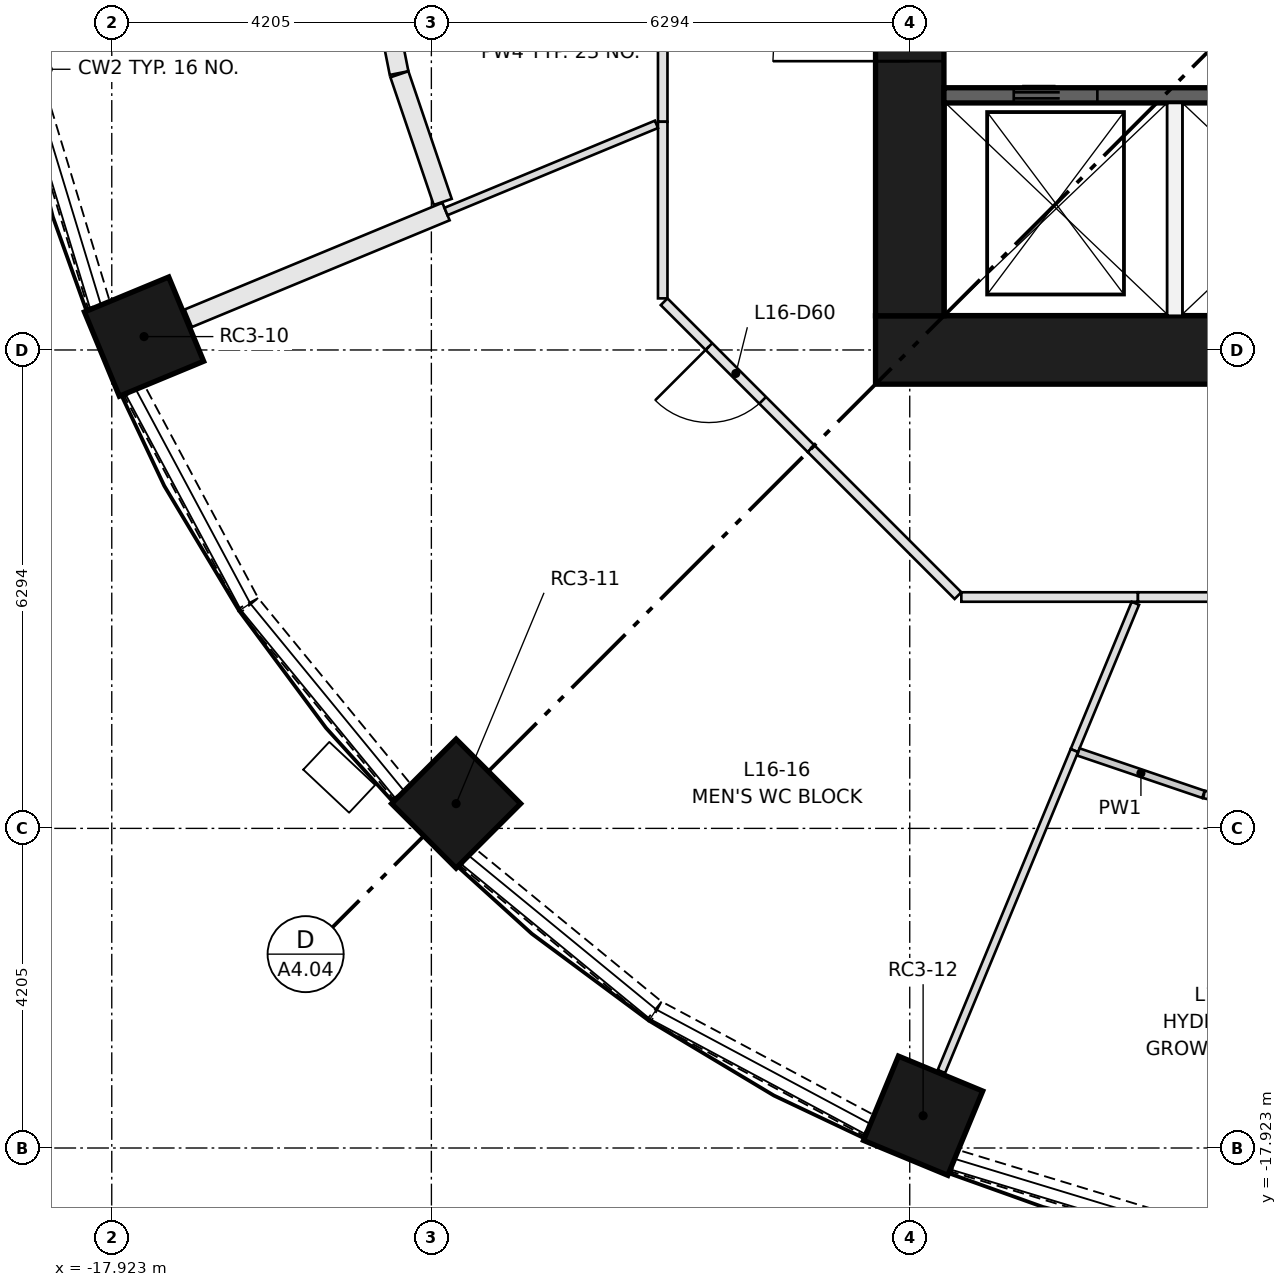
"""IFC4 building model, lengths in metres.
Left out: names, types, materials, properties, quantities, classifications, styles, units other than length and angle.
Written with IfcOpenShell. Run it as: python <this file> out.ifc"""

import sys

from ifc_helpers import new_model, si_unit, direction, frame, frame_2d, origin, origin_2d, place, context, subcontext, project, spatial, rectangle, extrude, element, fill, save


model = new_model("IFC4")
c1 = context("Model", 3, precision=1e-05, world=origin(), true_north=direction((0.0, 1.0)))
c2 = subcontext(c1, "Body", "Model", "MODEL_VIEW")
j1 = project(units=[si_unit("LENGTHUNIT", "METRE"), si_unit("PLANEANGLEUNIT", "RADIAN")], contexts=[c1])
p1 = place(None, origin())
s1 = spatial("IfcSite", under=j1, at=p1, CompositionType="ELEMENT")
p2 = place(p1, origin())
s2 = spatial("IfcBuilding", under=s1, at=p2, CompositionType="ELEMENT")
p3 = place(p2, frame((0.0, 0.0, 62.7)))
s3 = spatial("IfcBuildingStorey", under=s2, at=p3, CompositionType="ELEMENT", Elevation=62.7)
for number, where, z_axis, x_axis in (
    (1, (-17.498, -7.248, 0.0), (0.0, 0.0, 1.0), (-0.924, -0.383, 0.0)),
    (2, (-13.393, -13.393, 0.0), (0.0, 0.0, 1.0), (-0.707, -0.707, 0.0)),
    (3, (-7.248, -17.498, 0.0), (0.0, 0.0, 1.0), (-0.383, -0.924, 0.0)),
):
    element("IfcColumn", number, at=place(p3, frame(where, z_axis=z_axis, x_axis=x_axis)), inside=s3, PredefinedType="COLUMN", context=c2, shape_type="SweptSolid", body=[
        extrude(rectangle(XDim=1.2, YDim=1.2, at=origin_2d()), origin(), (0.0, 0.0, 1.0), 3.65),
    ])
p4 = place(p3, frame((-7.874, -7.424, 0.0), z_axis=(0.0, 0.0, 1.0), x_axis=(1.0, 0.0, 0.0)))
e4 = element("IfcWall", 4, at=p4, inside=s3, PredefinedType="SHEAR", context=c2, shape_type="SweptSolid", body=[
    extrude(rectangle(XDim=15.748, YDim=0.9, at=frame_2d((7.874, 0.0))), origin(), (0.0, 0.0, 1.0), 3.65),
])
p5 = place(p3, frame((-7.424, -6.974, 0.0), z_axis=(0.0, 0.0, 1.0), x_axis=(0.0, 1.0, 0.0)))
e5 = element("IfcWall", 5, at=p5, inside=s3, PredefinedType="SHEAR", context=c2, shape_type="SweptSolid", body=[
    extrude(rectangle(XDim=13.948, YDim=0.9, at=frame_2d((6.974, 0.0))), origin(), (0.0, 0.0, 1.0), 3.65),
])
p6 = place(p5, frame((6.474, 0.0, 0.0)))
e6 = element("IfcOpeningElement", 6, at=p6, cuts=e5, PredefinedType="OPENING", context=c2, shape_type="SweptSolid", body=[
    extrude(rectangle(XDim=1.0, YDim=2.1, at=frame_2d((0.5, 1.05))), frame((0.0, 0.46, 0.0), z_axis=(0.0, -1.0, 0.0), x_axis=(1.0, 0.0, 0.0)), (0.0, 0.0, 1.0), 0.92),
])
p7 = place(p5, frame((3.35, 0.0, 0.0)))
e7 = element("IfcOpeningElement", 7, at=p7, cuts=e5, PredefinedType="OPENING", context=c2, shape_type="SweptSolid", body=[
    extrude(rectangle(XDim=1.8, YDim=2.1, at=frame_2d((0.9, 1.05))), frame((0.0, 0.46, 0.0), z_axis=(0.0, -1.0, 0.0), x_axis=(1.0, 0.0, 0.0)), (0.0, 0.0, 1.0), 0.92),
])
p8 = place(p5, frame((8.799, 0.0, 0.0)))
e8 = element("IfcOpeningElement", 8, at=p8, cuts=e5, PredefinedType="OPENING", context=c2, shape_type="SweptSolid", body=[
    extrude(rectangle(XDim=1.8, YDim=2.1, at=frame_2d((0.9, 1.05))), frame((0.0, 0.46, 0.0), z_axis=(0.0, -1.0, 0.0), x_axis=(1.0, 0.0, 0.0)), (0.0, 0.0, 1.0), 0.92),
])
p9 = place(p5, frame((11.974, 0.0, 0.0)))
e9 = element("IfcOpeningElement", 9, at=p9, cuts=e5, PredefinedType="OPENING", context=c2, shape_type="SweptSolid", body=[
    extrude(rectangle(XDim=1.0, YDim=2.1, at=frame_2d((0.5, 1.05))), frame((0.0, 0.46, 0.0), z_axis=(0.0, -1.0, 0.0), x_axis=(1.0, 0.0, 0.0)), (0.0, 0.0, 1.0), 0.92),
])
p10 = place(p3, frame((-6.974, -4.074, 0.0), z_axis=(0.0, 0.0, 1.0), x_axis=(1.0, 0.0, 0.0)))
e10 = element("IfcWall", 10, at=p10, inside=s3, PredefinedType="SHEAR", context=c2, shape_type="SweptSolid", body=[
    extrude(rectangle(XDim=13.948, YDim=0.2, at=frame_2d((6.974, 0.0))), origin(), (0.0, 0.0, 1.0), 3.3),
])
p11 = place(p10, frame((0.918, 0.0, 0.0)))
e11 = element("IfcOpeningElement", 11, at=p11, cuts=e10, PredefinedType="OPENING", context=c2, shape_type="SweptSolid", body=[
    extrude(rectangle(XDim=1.1, YDim=2.1, at=frame_2d((0.55, 1.05))), frame((0.0, 0.11, 0.0), z_axis=(0.0, -1.0, 0.0), x_axis=(1.0, 0.0, 0.0)), (0.0, 0.0, 1.0), 0.22),
])
p12 = place(p10, frame((4.055, 0.0, 0.0)))
e12 = element("IfcOpeningElement", 12, at=p12, cuts=e10, PredefinedType="OPENING", context=c2, shape_type="SweptSolid", body=[
    extrude(rectangle(XDim=1.1, YDim=2.1, at=frame_2d((0.55, 1.05))), frame((0.0, 0.11, 0.0), z_axis=(0.0, -1.0, 0.0), x_axis=(1.0, 0.0, 0.0)), (0.0, 0.0, 1.0), 0.22),
])
p13 = place(p10, frame((6.658, 0.0, 0.0)))
e13 = element("IfcOpeningElement", 13, at=p13, cuts=e10, PredefinedType="OPENING", context=c2, shape_type="SweptSolid", body=[
    extrude(rectangle(XDim=1.0, YDim=2.1, at=frame_2d((0.5, 1.05))), frame((0.0, 0.11, 0.0), z_axis=(0.0, -1.0, 0.0), x_axis=(1.0, 0.0, 0.0)), (0.0, 0.0, 1.0), 0.22),
])
p14 = place(p10, frame((8.627, 0.0, 0.0)))
e14 = element("IfcOpeningElement", 14, at=p14, cuts=e10, PredefinedType="OPENING", context=c2, shape_type="SweptSolid", body=[
    extrude(rectangle(XDim=1.0, YDim=2.1, at=frame_2d((0.5, 1.05))), frame((0.0, 0.11, 0.0), z_axis=(0.0, -1.0, 0.0), x_axis=(1.0, 0.0, 0.0)), (0.0, 0.0, 1.0), 0.22),
])
p15 = place(p10, frame((10.595, 0.0, 0.0)))
e15 = element("IfcOpeningElement", 15, at=p15, cuts=e10, PredefinedType="OPENING", context=c2, shape_type="SweptSolid", body=[
    extrude(rectangle(XDim=1.0, YDim=2.1, at=frame_2d((0.5, 1.05))), frame((0.0, 0.11, 0.0), z_axis=(0.0, -1.0, 0.0), x_axis=(1.0, 0.0, 0.0)), (0.0, 0.0, 1.0), 0.22),
])
p16 = place(p10, frame((12.564, 0.0, 0.0)))
e16 = element("IfcOpeningElement", 16, at=p16, cuts=e10, PredefinedType="OPENING", context=c2, shape_type="SweptSolid", body=[
    extrude(rectangle(XDim=1.0, YDim=2.1, at=frame_2d((0.5, 1.05))), frame((0.0, 0.11, 0.0), z_axis=(0.0, -1.0, 0.0), x_axis=(1.0, 0.0, 0.0)), (0.0, 0.0, 1.0), 0.22),
])
p17 = place(p3, frame((-3.937, -6.974, 0.0), z_axis=(0.0, 0.0, 1.0), x_axis=(0.0, 1.0, 0.0)))
e17 = element("IfcWall", 17, at=p17, inside=s3, PredefinedType="PARTITIONING", context=c2, shape_type="SweptSolid", body=[
    extrude(rectangle(XDim=2.8, YDim=0.2, at=frame_2d((1.4, 0.0))), origin(), (0.0, 0.0, 1.0), 3.3),
])
p18 = place(p3, frame((-19.013, -3.797, 0.0), z_axis=(0.0, 0.0, 1.0), x_axis=(0.290456409527, -0.956888224489, 0.0)))
e18 = element("IfcWall", 18, at=p18, inside=s3, PredefinedType="SOLIDWALL", context=c2, shape_type="SweptSolid", body=[
    extrude(rectangle(XDim=3.169, YDim=0.3, at=frame_2d((1.584, 0.0))), origin(), (0.0, 0.0, 1.0), 0.9),
])
p19 = place(p3, frame((-17.623, -7.963, 0.0), z_axis=(0.0, 0.0, 1.0), x_axis=(0.47123575379, -0.882007292685, 0.0)))
e19 = element("IfcWall", 19, at=p19, inside=s3, PredefinedType="SOLIDWALL", context=c2, shape_type="SweptSolid", body=[
    extrude(rectangle(XDim=3.17, YDim=0.3, at=frame_2d((1.585, 0.0))), origin(), (0.0, 0.0, 1.0), 0.9),
])
for number, where, z_axis, x_axis in (
    (20, (-16.113, -10.784, 0.0), (0.0, 0.0, 1.0), (0.634, -0.773, 0.0)),
    (21, (-13.234, -14.103, 0.0), (0.0, 0.0, 1.0), (0.773, -0.634, 0.0)),
):
    element("IfcWall", number, at=place(p3, frame(where, z_axis=z_axis, x_axis=x_axis)), inside=s3, PredefinedType="SOLIDWALL", context=c2, shape_type="SweptSolid", body=[
        extrude(rectangle(XDim=3.169, YDim=0.3, at=frame_2d((1.585, 0.0))), origin(), (0.0, 0.0, 1.0), 0.9),
    ])
p20 = place(p3, frame((-10.759, -16.129, 0.0), z_axis=(0.0, 0.0, 1.0), x_axis=(0.882007292685, -0.47123575379, 0.0)))
e22 = element("IfcWall", 22, at=p20, inside=s3, PredefinedType="SOLIDWALL", context=c2, shape_type="SweptSolid", body=[
    extrude(rectangle(XDim=3.17, YDim=0.3, at=frame_2d((1.585, 0.0))), origin(), (0.0, 0.0, 1.0), 0.9),
])
p21 = place(p3, frame((-6.83, -18.092, 0.0), z_axis=(0.0, 0.0, 1.0), x_axis=(0.956888224489, -0.290456409527, 0.0)))
e23 = element("IfcWall", 23, at=p21, inside=s3, PredefinedType="SOLIDWALL", context=c2, shape_type="SweptSolid", body=[
    extrude(rectangle(XDim=3.169, YDim=0.3, at=frame_2d((1.584, 0.0))), origin(), (0.0, 0.0, 1.0), 0.9),
])
p22 = place(p3, frame((-10.674, -4.421, 0.0), z_axis=(0.0, 0.0, 1.0), x_axis=(0.0, 1.0, 0.0)))
e24 = element("IfcWall", 24, at=p22, inside=s3, PredefinedType="PARTITIONING", context=c2, shape_type="SweptSolid", body=[
    extrude(rectangle(XDim=4.484, YDim=0.125, at=frame_2d((2.242, 0.0))), origin(), (0.0, 0.0, 1.0), 3.3),
])
p23 = place(p22, frame((1.7, 0.0, 0.0)))
e25 = element("IfcOpeningElement", 25, at=p23, cuts=e24, PredefinedType="OPENING", context=c2, shape_type="SweptSolid", body=[
    extrude(rectangle(XDim=1.0, YDim=2.1, at=frame_2d((0.5, 1.05))), frame((0.0, 0.073, 0.0), z_axis=(0.0, -1.0, 0.0), x_axis=(1.0, 0.0, 0.0)), (0.0, 0.0, 1.0), 0.145),
])
p24 = place(p3, frame((-10.674, -6.745, 0.0), z_axis=(0.0, 0.0, 1.0), x_axis=(0.0, 1.0, 0.0)))
e26 = element("IfcWall", 26, at=p24, inside=s3, PredefinedType="PARTITIONING", context=c2, shape_type="SweptSolid", body=[
    extrude(rectangle(XDim=2.324, YDim=0.125, at=frame_2d((1.162, 0.0))), origin(), (0.0, 0.0, 1.0), 3.3),
])
p25 = place(p3, frame((-8.722, -8.722, 0.0), z_axis=(0.0, 0.0, 1.0), x_axis=(-0.707151428813, 0.707062130741, 0.0)))
e27 = element("IfcWall", 27, at=p25, inside=s3, PredefinedType="PARTITIONING", context=c2, shape_type="SweptSolid", body=[
    extrude(rectangle(XDim=2.734, YDim=0.125, at=frame_2d((1.367, 0.0))), origin(), (0.0, 0.0, 1.0), 3.3),
])
p26 = place(p25, frame((0.9, 0.0, 0.0)))
e28 = element("IfcOpeningElement", 28, at=p26, cuts=e27, PredefinedType="OPENING", context=c2, shape_type="SweptSolid", body=[
    extrude(rectangle(XDim=1.0, YDim=2.1, at=frame_2d((0.5, 1.05))), frame((0.0, 0.073, 0.0), z_axis=(0.0, -1.0, 0.0), x_axis=(1.0, 0.0, 0.0)), (0.0, 0.0, 1.0), 0.145),
])
p27 = place(p3, frame((-6.789, -10.656, 0.0), z_axis=(0.0, 0.0, 1.0), x_axis=(-0.707062130741, 0.707151428813, 0.0)))
e29 = element("IfcWall", 29, at=p27, inside=s3, PredefinedType="PARTITIONING", context=c2, shape_type="SweptSolid", body=[
    extrude(rectangle(XDim=2.734, YDim=0.125, at=frame_2d((1.367, 0.0))), origin(), (0.0, 0.0, 1.0), 3.3),
])
p28 = place(p3, frame((-4.421, -10.674, 0.0), z_axis=(0.0, 0.0, 1.0), x_axis=(-1.0, 0.0, 0.0)))
e30 = element("IfcWall", 30, at=p28, inside=s3, PredefinedType="PARTITIONING", context=c2, shape_type="SweptSolid", body=[
    extrude(rectangle(XDim=2.324, YDim=0.125, at=frame_2d((1.162, 0.0))), origin(), (0.0, 0.0, 1.0), 3.3),
])
p29 = place(p3, frame((0.0, -10.674, 0.0), z_axis=(0.0, 0.0, 1.0), x_axis=(-1.0, 0.0, 0.0)))
e31 = element("IfcWall", 31, at=p29, inside=s3, PredefinedType="PARTITIONING", context=c2, shape_type="SweptSolid", body=[
    extrude(rectangle(XDim=4.421, YDim=0.125, at=frame_2d((2.211, 0.0))), origin(), (0.0, 0.0, 1.0), 3.3),
])
p30 = place(p29, frame((1.7, 0.0, 0.0)))
e32 = element("IfcOpeningElement", 32, at=p30, cuts=e31, PredefinedType="OPENING", context=c2, shape_type="SweptSolid", body=[
    extrude(rectangle(XDim=1.0, YDim=2.1, at=frame_2d((0.5, 1.05))), frame((0.0, 0.073, 0.0), z_axis=(0.0, -1.0, 0.0), x_axis=(1.0, 0.0, 0.0)), (0.0, 0.0, 1.0), 0.145),
])
p31 = place(p3, frame((-14.513, -1.919, 0.0), z_axis=(0.0, 0.0, 1.0), x_axis=(0.195077379777, -0.980787854686, 0.0)))
e33 = element("IfcWall", 33, at=p31, inside=s3, PredefinedType="PARTITIONING", context=c2, shape_type="SweptSolid", body=[
    extrude(rectangle(XDim=1.898, YDim=0.25, at=frame_2d((0.949, 0.0))), origin(), (0.0, 0.0, 1.0), 3.3),
])
p32 = place(p3, frame((-14.139, -3.797, 0.0), z_axis=(0.0, 0.0, 1.0), x_axis=(0.321468303742, -0.946920339674, 0.0)))
e34 = element("IfcWall", 34, at=p32, inside=s3, PredefinedType="PARTITIONING", context=c2, shape_type="SweptSolid", body=[
    extrude(rectangle(XDim=1.773, YDim=0.25, at=frame_2d((0.887, 0.0))), origin(), (0.0, 0.0, 1.0), 3.3),
])
p33 = place(p3, frame((-13.526, -5.603, 0.0), z_axis=(0.0, 0.0, 1.0), x_axis=(-0.923870076355, -0.382706260748, 0.0)))
e35 = element("IfcWall", 35, at=p33, inside=s3, PredefinedType="PARTITIONING", context=c2, shape_type="SweptSolid", body=[
    extrude(rectangle(XDim=3.67, YDim=0.25, at=frame_2d((1.835, 0.0))), origin(), (0.0, 0.0, 1.0), 3.3),
])
p34 = place(p3, frame((-10.757, -4.456, 0.0), z_axis=(0.0, 0.0, 1.0), x_axis=(-0.923879826967, -0.382682721486, 0.0)))
e36 = element("IfcWall", 36, at=p34, inside=s3, PredefinedType="PARTITIONING", context=c2, shape_type="SweptSolid", body=[
    extrude(rectangle(XDim=2.997, YDim=0.105, at=frame_2d((1.499, 0.0))), origin(), (0.0, 0.0, 1.0), 3.3),
])
p35 = place(p3, frame((-4.456, -10.757, 0.0), z_axis=(0.0, 0.0, 1.0), x_axis=(-0.382663674763, -0.92388771613, 0.0)))
e37 = element("IfcWall", 37, at=p35, inside=s3, PredefinedType="PARTITIONING", context=c2, shape_type="SweptSolid", body=[
    extrude(rectangle(XDim=2.097, YDim=0.105, at=frame_2d((1.049, 0.0))), origin(), (0.0, 0.0, 1.0), 3.3),
])
p36 = place(p3, frame((-5.258, -12.694, 0.0), z_axis=(0.0, 0.0, 1.0), x_axis=(-0.382710364739, -0.923868376297, 0.0)))
e38 = element("IfcWall", 38, at=p36, inside=s3, PredefinedType="PARTITIONING", context=c2, shape_type="SweptSolid", body=[
    extrude(rectangle(XDim=4.57, YDim=0.105, at=frame_2d((2.285, 0.0))), origin(), (0.0, 0.0, 1.0), 3.3),
])
p37 = place(p3, frame((-3.559, -13.271, 0.0), z_axis=(0.0, 0.0, 1.0), x_axis=(-0.946941295521, 0.321406569374, 0.0)))
e39 = element("IfcWall", 39, at=p37, inside=s3, PredefinedType="PARTITIONING", context=c2, shape_type="SweptSolid", body=[
    extrude(rectangle(XDim=1.738, YDim=0.1, at=frame_2d((0.869, 0.0))), origin(), (0.0, 0.0, 1.0), 3.3),
])
p38 = place(p3, frame((-1.797, -13.622, 0.0), z_axis=(0.0, 0.0, 1.0), x_axis=(-0.980784643133, 0.195093525761, 0.0)))
e40 = element("IfcWall", 40, at=p38, inside=s3, PredefinedType="PARTITIONING", context=c2, shape_type="SweptSolid", body=[
    extrude(rectangle(XDim=1.791, YDim=0.1, at=frame_2d((0.896, 0.0))), origin(), (0.0, 0.0, 1.0), 3.3),
])
p39 = place(p11, origin())
e41 = element("IfcDoor", 41, at=p39, inside=s3, OperationType="DOUBLE_DOOR_SLIDING", PredefinedType="DOOR", context=c2, shape_type="SweptSolid", body=[
    extrude(rectangle(XDim=1.1, YDim=2.1, at=frame_2d((0.55, 1.05))), frame((0.0, 0.025, 0.0), z_axis=(0.0, -1.0, 0.0), x_axis=(1.0, 0.0, 0.0)), (0.0, 0.0, 1.0), 0.05),
])
fill(e11, e41)
p40 = place(p7, origin())
e42 = element("IfcDoor", 42, at=p40, inside=s3, OperationType="DOUBLE_DOOR_SINGLE_SWING", PredefinedType="DOOR", context=c2, shape_type="SweptSolid", body=[
    extrude(rectangle(XDim=1.8, YDim=2.1, at=frame_2d((0.9, 1.05))), frame((0.0, 0.025, 0.0), z_axis=(0.0, -1.0, 0.0), x_axis=(1.0, 0.0, 0.0)), (0.0, 0.0, 1.0), 0.05),
])
fill(e7, e42)
p41 = place(p26, origin())
e43 = element("IfcDoor", 43, at=p41, inside=s3, OperationType="SINGLE_SWING_RIGHT", PredefinedType="DOOR", context=c2, shape_type="SweptSolid", body=[
    extrude(rectangle(XDim=1.0, YDim=2.1, at=frame_2d((0.5, 1.05))), frame((0.0, 0.025, 0.0), z_axis=(0.0, -1.0, 0.0), x_axis=(1.0, 0.0, 0.0)), (0.0, 0.0, 1.0), 0.05),
])
fill(e28, e43)
save(model, sys.argv[1])
